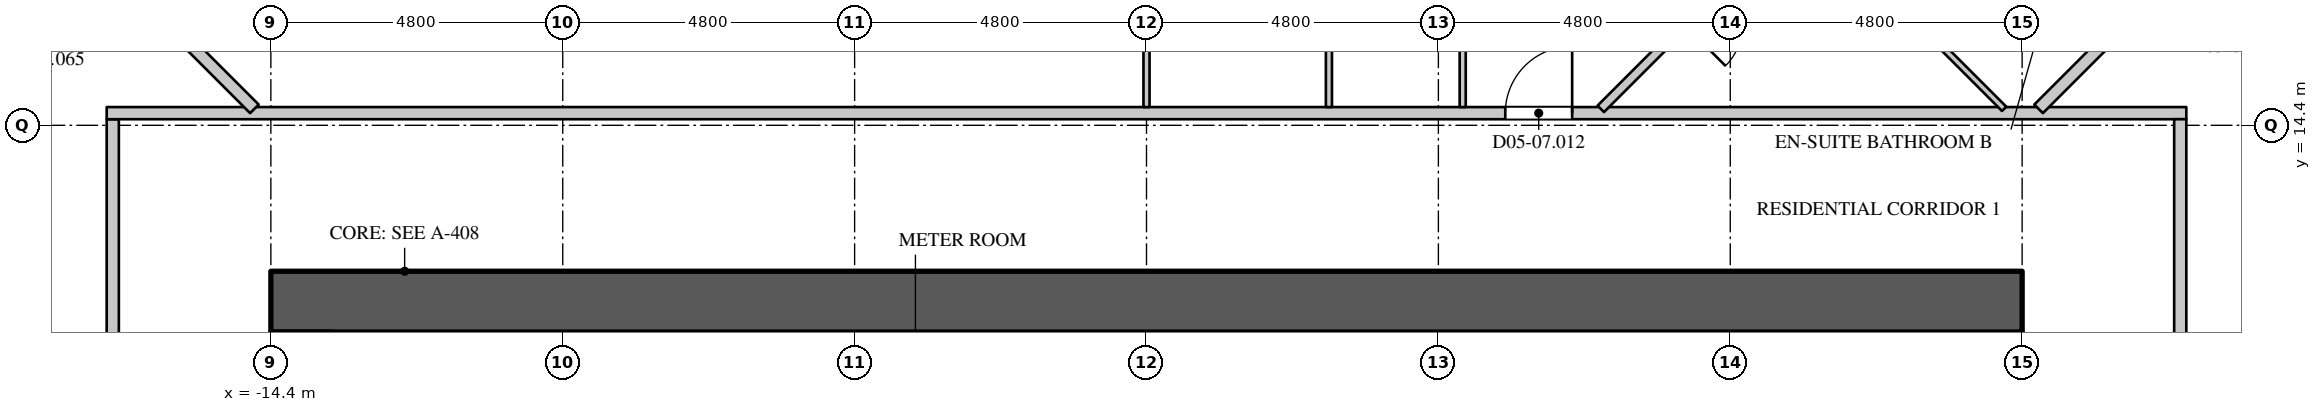
"""IFC4 building model, lengths in metres.
Left out: names, types, materials, properties, quantities, classifications, styles, units other than length and angle.
Written with IfcOpenShell. Run it as: python <this file> out.ifc"""

import sys

from ifc_helpers import new_model, si_unit, direction, frame, frame_2d, origin, place, context, subcontext, project, spatial, rectangle, extrude, element, fill, save


model = new_model("IFC4")
c1 = context("Model", 3, precision=1e-05, world=origin(), true_north=direction((0.0, 1.0)))
c2 = subcontext(c1, "Body", "Model", "MODEL_VIEW")
j1 = project(units=[si_unit("LENGTHUNIT", "METRE"), si_unit("PLANEANGLEUNIT", "RADIAN")], contexts=[c1])
p1 = place(None, origin())
s1 = spatial("IfcSite", under=j1, at=p1, CompositionType="ELEMENT")
p2 = place(p1, origin())
s2 = spatial("IfcBuilding", under=s1, at=p2, CompositionType="ELEMENT")
p3 = place(p2, frame((0.0, 0.0, 25.5)))
s3 = spatial("IfcBuildingStorey", under=s2, at=p3, CompositionType="ELEMENT", Elevation=25.5)
p4 = place(p3, frame((-14.4, 11.5, 0.0), z_axis=(0.0, 0.0, 1.0), x_axis=(1.0, 0.0, 0.0)))
e1 = element("IfcWall", 1, at=p4, inside=s3, PredefinedType="SHEAR", context=c2, shape_type="SweptSolid", body=[
    extrude(rectangle(XDim=28.8, YDim=1.0, at=frame_2d((14.4, 0.0))), origin(), (0.0, 0.0, 1.0), 4.2),
])
p5 = place(p3, frame((-17.0, -14.5, 0.0), z_axis=(0.0, 0.0, 1.0), x_axis=(0.0, 1.0, 0.0)))
e2 = element("IfcWall", 2, at=p5, inside=s3, PredefinedType="PARTITIONING", context=c2, shape_type="SweptSolid", body=[
    extrude(rectangle(XDim=29.0, YDim=0.2, at=frame_2d((14.5, 0.0))), origin(), (0.0, 0.0, 1.0), 3.95),
])
p6 = place(p5, frame((21.35, 0.0, 0.0)))
e3 = element("IfcOpeningElement", 3, at=p6, cuts=e2, PredefinedType="OPENING", context=c2, shape_type="SweptSolid", body=[
    extrude(rectangle(XDim=1.1, YDim=2.4, at=frame_2d((0.55, 1.2))), frame((0.0, 0.11, 0.0), z_axis=(0.0, -1.0, 0.0), x_axis=(1.0, 0.0, 0.0)), (0.0, 0.0, 1.0), 0.22),
])
p7 = place(p3, frame((-17.1, 14.6, 0.0), z_axis=(0.0, 0.0, 1.0), x_axis=(1.0, 0.0, 0.0)))
e4 = element("IfcWall", 4, at=p7, inside=s3, PredefinedType="PARTITIONING", context=c2, shape_type="SweptSolid", body=[
    extrude(rectangle(XDim=34.2, YDim=0.2, at=frame_2d((17.1, 0.0))), origin(), (0.0, 0.0, 1.0), 3.95),
])
p8 = place(p7, frame((23.0, 0.0, 0.0)))
e5 = element("IfcOpeningElement", 5, at=p8, cuts=e4, PredefinedType="OPENING", context=c2, shape_type="SweptSolid", body=[
    extrude(rectangle(XDim=1.1, YDim=2.4, at=frame_2d((0.55, 1.2))), frame((0.0, 0.11, 0.0), z_axis=(0.0, -1.0, 0.0), x_axis=(1.0, 0.0, 0.0)), (0.0, 0.0, 1.0), 0.22),
])
p9 = place(p3, frame((17.0, -14.5, 0.0), z_axis=(0.0, 0.0, 1.0), x_axis=(0.0, 1.0, 0.0)))
e6 = element("IfcWall", 6, at=p9, inside=s3, PredefinedType="PARTITIONING", context=c2, shape_type="SweptSolid", body=[
    extrude(rectangle(XDim=29.0, YDim=0.2, at=frame_2d((14.5, 0.0))), origin(), (0.0, 0.0, 1.0), 3.95),
])
p10 = place(p9, frame((6.55, 0.0, 0.0)))
e7 = element("IfcOpeningElement", 7, at=p10, cuts=e6, PredefinedType="OPENING", context=c2, shape_type="SweptSolid", body=[
    extrude(rectangle(XDim=1.1, YDim=2.4, at=frame_2d((0.55, 1.2))), frame((0.0, 0.11, 0.0), z_axis=(0.0, -1.0, 0.0), x_axis=(1.0, 0.0, 0.0)), (0.0, 0.0, 1.0), 0.22),
])
p11 = place(p3, frame((-22.947, 12.051, 0.0), z_axis=(0.0, 0.0, 1.0), x_axis=(0.707106781187, 0.707106781187, 0.0)))
e8 = element("IfcWall", 8, at=p11, inside=s3, PredefinedType="PARTITIONING", context=c2, shape_type="SweptSolid", body=[
    extrude(rectangle(XDim=7.705, YDim=0.15, at=frame_2d((3.853, 0.0))), origin(), (0.0, 0.0, 1.0), 3.95),
])
p12 = place(p11, frame((4.75, 0.0, 0.0)))
e9 = element("IfcOpeningElement", 9, at=p12, cuts=e8, PredefinedType="OPENING", context=c2, shape_type="SweptSolid", body=[
    extrude(rectangle(XDim=0.95, YDim=2.2, at=frame_2d((0.475, 1.1))), frame((0.0, 0.085, 0.0), z_axis=(0.0, -1.0, 0.0), x_axis=(1.0, 0.0, 0.0)), (0.0, 0.0, 1.0), 0.17),
])
p13 = place(p3, frame((7.471, 14.671, 0.0), z_axis=(0.0, 0.0, 1.0), x_axis=(0.707106781187, 0.707106781187, 0.0)))
e10 = element("IfcWall", 10, at=p13, inside=s3, PredefinedType="PARTITIONING", context=c2, shape_type="SweptSolid", body=[
    extrude(rectangle(XDim=3.086, YDim=0.15, at=frame_2d((1.543, 0.0))), origin(), (0.0, 0.0, 1.0), 3.95),
])
p14 = place(p13, frame((1.95, 0.0, 0.0)))
e11 = element("IfcOpeningElement", 11, at=p14, cuts=e10, PredefinedType="OPENING", context=c2, shape_type="SweptSolid", body=[
    extrude(rectangle(XDim=0.95, YDim=2.2, at=frame_2d((0.475, 1.1))), frame((0.0, 0.085, 0.0), z_axis=(0.0, -1.0, 0.0), x_axis=(1.0, 0.0, 0.0)), (0.0, 0.0, 1.0), 0.17),
])
p15 = place(p3, frame((17.499, 17.499, 0.0), z_axis=(0.0, 0.0, 1.0), x_axis=(0.707106781187, -0.707106781187, 0.0)))
e12 = element("IfcWall", 12, at=p15, inside=s3, PredefinedType="PARTITIONING", context=c2, shape_type="SweptSolid", body=[
    extrude(rectangle(XDim=7.855, YDim=0.15, at=frame_2d((3.927, 0.0))), origin(), (0.0, 0.0, 1.0), 3.95),
])
p16 = place(p15, frame((2.1, 0.0, 0.0)))
e13 = element("IfcOpeningElement", 13, at=p16, cuts=e12, PredefinedType="OPENING", context=c2, shape_type="SweptSolid", body=[
    extrude(rectangle(XDim=0.95, YDim=2.2, at=frame_2d((0.475, 1.1))), frame((0.0, 0.085, 0.0), z_axis=(0.0, -1.0, 0.0), x_axis=(1.0, 0.0, 0.0)), (0.0, 0.0, 1.0), 0.17),
])
p17 = place(p15, frame((6.7, 0.0, 0.0)))
e14 = element("IfcOpeningElement", 14, at=p17, cuts=e12, PredefinedType="OPENING", context=c2, shape_type="SweptSolid", body=[
    extrude(rectangle(XDim=0.95, YDim=2.2, at=frame_2d((0.475, 1.1))), frame((0.0, 0.085, 0.0), z_axis=(0.0, -1.0, 0.0), x_axis=(1.0, 0.0, 0.0)), (0.0, 0.0, 1.0), 0.17),
])
for number, where, z_axis, x_axis in (
    (15, (-19.606, 19.606, 0.0), (0.0, 0.0, 1.0), (0.707, -0.707, 0.0)),
    (16, (14.671, 14.671, 0.0), (0.0, 0.0, 1.0), (0.707, 0.707, 0.0)),
):
    element("IfcWall", number, at=place(p3, frame(where, z_axis=z_axis, x_axis=x_axis)), inside=s3, PredefinedType="PARTITIONING", context=c2, shape_type="SweptSolid", body=[
        extrude(rectangle(XDim=6.979, YDim=0.2, at=frame_2d((3.49, 0.0))), origin(), (0.0, 0.0, 1.0), 3.95),
    ])
p18 = place(p3, frame((0.0, 14.7, 0.0), z_axis=(0.0, 0.0, 1.0), x_axis=(0.0, 1.0, 0.0)))
e17 = element("IfcWall", 17, at=p18, inside=s3, PredefinedType="PARTITIONING", context=c2, shape_type="SweptSolid", body=[
    extrude(rectangle(XDim=7.12, YDim=0.1, at=frame_2d((3.56, 0.0))), origin(), (0.0, 0.0, 1.0), 3.95),
])
p19 = place(p18, frame((1.85, 0.0, 0.0)))
e18 = element("IfcOpeningElement", 18, at=p19, cuts=e17, PredefinedType="OPENING", context=c2, shape_type="SweptSolid", body=[
    extrude(rectangle(XDim=0.9, YDim=2.2, at=frame_2d((0.45, 1.1))), frame((0.0, 0.06, 0.0), z_axis=(0.0, -1.0, 0.0), x_axis=(1.0, 0.0, 0.0)), (0.0, 0.0, 1.0), 0.12),
])
p20 = place(p3, frame((3.0, 14.7, 0.0), z_axis=(0.0, 0.0, 1.0), x_axis=(0.0, 1.0, 0.0)))
e19 = element("IfcWall", 19, at=p20, inside=s3, PredefinedType="PARTITIONING", context=c2, shape_type="SweptSolid", body=[
    extrude(rectangle(XDim=7.05, YDim=0.1, at=frame_2d((3.525, 0.0))), origin(), (0.0, 0.0, 1.0), 3.95),
])
p21 = place(p3, frame((5.2, 14.7, 0.0), z_axis=(0.0, 0.0, 1.0), x_axis=(0.0, 1.0, 0.0)))
e20 = element("IfcWall", 20, at=p21, inside=s3, PredefinedType="PARTITIONING", context=c2, shape_type="SweptSolid", body=[
    extrude(rectangle(XDim=7.025, YDim=0.1, at=frame_2d((3.513, 0.0))), origin(), (0.0, 0.0, 1.0), 3.95),
])
p22 = place(p21, frame((3.05, 0.0, 0.0)))
e21 = element("IfcOpeningElement", 21, at=p22, cuts=e20, PredefinedType="OPENING", context=c2, shape_type="SweptSolid", body=[
    extrude(rectangle(XDim=0.9, YDim=2.2, at=frame_2d((0.45, 1.1))), frame((0.0, 0.06, 0.0), z_axis=(0.0, -1.0, 0.0), x_axis=(1.0, 0.0, 0.0)), (0.0, 0.0, 1.0), 0.12),
])
p23 = place(p3, frame((12.372, 16.403, 0.0), z_axis=(0.0, 0.0, 1.0), x_axis=(0.707056944574, -0.707156614287, 0.0)))
e22 = element("IfcWall", 22, at=p23, inside=s3, PredefinedType="PARTITIONING", context=c2, shape_type="SweptSolid", body=[
    extrude(rectangle(XDim=2.449, YDim=0.1, at=frame_2d((1.225, 0.0))), origin(), (0.0, 0.0, 1.0), 3.95),
])
p24 = place(p8, origin())
e23 = element("IfcDoor", 23, at=p24, inside=s3, OperationType="SINGLE_SWING_RIGHT", PredefinedType="DOOR", context=c2, shape_type="SweptSolid", body=[
    extrude(rectangle(XDim=1.1, YDim=2.4, at=frame_2d((0.55, 1.2))), frame((0.0, 0.025, 0.0), z_axis=(0.0, -1.0, 0.0), x_axis=(1.0, 0.0, 0.0)), (0.0, 0.0, 1.0), 0.05),
])
fill(e5, e23)
save(model, sys.argv[1])
